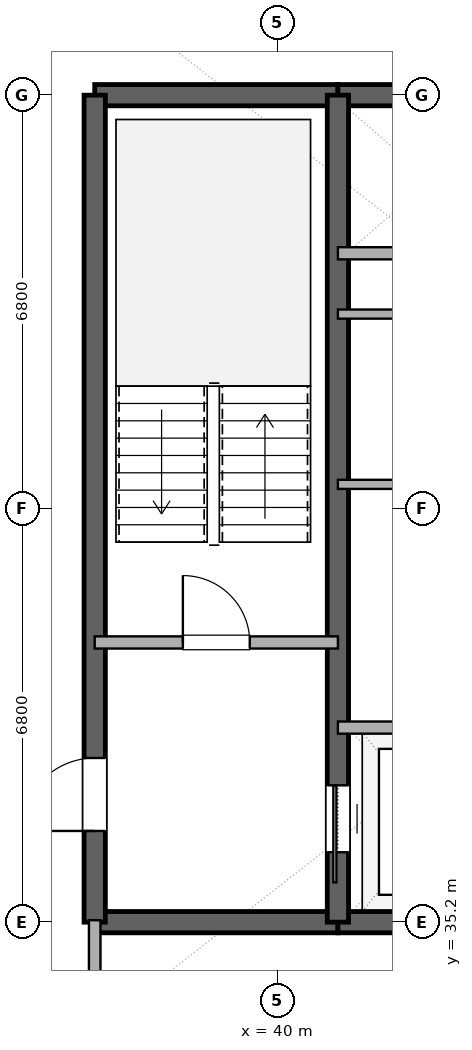
"""IFC4 building model, lengths in metres.
Left out: names, types, materials, properties, quantities, classifications, styles, units other than length and angle.
Written with IfcOpenShell. Run it as: python <this file> out.ifc"""

import sys

from ifc_helpers import new_model, si_unit, direction, frame, frame_2d, origin, place, context, subcontext, project, spatial, rectangle, extrude, element, fill, save


model = new_model("IFC4")
c1 = context("Model", 3, precision=1e-05, world=origin(), true_north=direction((0.0, 1.0)))
c2 = subcontext(c1, "Body", "Model", "MODEL_VIEW")
j1 = project(units=[si_unit("LENGTHUNIT", "METRE"), si_unit("PLANEANGLEUNIT", "RADIAN")], contexts=[c1])
p1 = place(None, origin())
s1 = spatial("IfcSite", under=j1, at=p1, CompositionType="ELEMENT")
p2 = place(p1, origin())
s2 = spatial("IfcBuilding", under=s1, at=p2, CompositionType="ELEMENT")
p3 = place(p2, frame((0.0, 0.0, 287.4)))
s3 = spatial("IfcBuildingStorey", under=s2, at=p3, CompositionType="ELEMENT", Elevation=287.4)
p4 = place(p3, frame((37.0, 35.2, 0.0), z_axis=(0.0, 0.0, 1.0), x_axis=(1.0, 0.0, 0.0)))
e1 = element("IfcWall", 1, at=p4, inside=s3, PredefinedType="SHEAR", context=c2, shape_type="SweptSolid", body=[
    extrude(rectangle(XDim=4.0, YDim=0.35, at=frame_2d((2.0, 0.0))), origin(), (0.0, 0.0, 1.0), 3.37),
])
p5 = place(p3, frame((41.0, 35.2, 0.0), z_axis=(0.0, 0.0, 1.0), x_axis=(1.0, 0.0, 0.0)))
e2 = element("IfcWall", 2, at=p5, inside=s3, PredefinedType="SHEAR", context=c2, shape_type="SweptSolid", body=[
    extrude(rectangle(XDim=14.0, YDim=0.35, at=frame_2d((7.0, 0.0))), origin(), (0.0, 0.0, 1.0), 3.37),
])
p6 = place(p5, frame((6.1, 0.0, 0.0)))
e3 = element("IfcOpeningElement", 3, at=p6, cuts=e2, PredefinedType="OPENING", context=c2, shape_type="SweptSolid", body=[
    extrude(rectangle(XDim=1.8, YDim=2.25, at=frame_2d((0.9, 1.125))), frame((0.0, 0.185, 0.0), z_axis=(0.0, -1.0, 0.0), x_axis=(1.0, 0.0, 0.0)), (0.0, 0.0, 1.0), 0.37),
])
p7 = place(p3, frame((37.0, 48.8, 0.0), z_axis=(0.0, 0.0, 1.0), x_axis=(1.0, 0.0, 0.0)))
e4 = element("IfcWall", 4, at=p7, inside=s3, PredefinedType="SHEAR", context=c2, shape_type="SweptSolid", body=[
    extrude(rectangle(XDim=4.0, YDim=0.35, at=frame_2d((2.0, 0.0))), origin(), (0.0, 0.0, 1.0), 3.37),
])
p8 = place(p3, frame((41.0, 48.8, 0.0), z_axis=(0.0, 0.0, 1.0), x_axis=(1.0, 0.0, 0.0)))
e5 = element("IfcWall", 5, at=p8, inside=s3, PredefinedType="SHEAR", context=c2, shape_type="SweptSolid", body=[
    extrude(rectangle(XDim=14.0, YDim=0.35, at=frame_2d((7.0, 0.0))), origin(), (0.0, 0.0, 1.0), 3.37),
])
p9 = place(p8, frame((6.1, 0.0, 0.0)))
e6 = element("IfcOpeningElement", 6, at=p9, cuts=e5, PredefinedType="OPENING", context=c2, shape_type="SweptSolid", body=[
    extrude(rectangle(XDim=1.8, YDim=2.25, at=frame_2d((0.9, 1.125))), frame((0.0, 0.185, 0.0), z_axis=(0.0, -1.0, 0.0), x_axis=(1.0, 0.0, 0.0)), (0.0, 0.0, 1.0), 0.37),
])
p10 = place(p3, frame((37.0, 35.2, 0.0), z_axis=(0.0, 0.0, 1.0), x_axis=(0.0, 1.0, 0.0)))
e7 = element("IfcWall", 7, at=p10, inside=s3, PredefinedType="SHEAR", context=c2, shape_type="SweptSolid", body=[
    extrude(rectangle(XDim=13.6, YDim=0.35, at=frame_2d((6.8, 0.0))), origin(), (0.0, 0.0, 1.0), 3.37),
])
p11 = place(p10, frame((1.5, 0.0, 0.0)))
e8 = element("IfcOpeningElement", 8, at=p11, cuts=e7, PredefinedType="OPENING", context=c2, shape_type="SweptSolid", body=[
    extrude(rectangle(XDim=1.2, YDim=2.15, at=frame_2d((0.6, 1.075))), frame((0.0, 0.185, 0.0), z_axis=(0.0, -1.0, 0.0), x_axis=(1.0, 0.0, 0.0)), (0.0, 0.0, 1.0), 0.37),
])
p12 = place(p3, frame((41.0, 35.2, 0.0), z_axis=(0.0, 0.0, 1.0), x_axis=(0.0, 1.0, 0.0)))
e9 = element("IfcWall", 9, at=p12, inside=s3, PredefinedType="SHEAR", context=c2, shape_type="SweptSolid", body=[
    extrude(rectangle(XDim=13.6, YDim=0.35, at=frame_2d((6.8, 0.0))), origin(), (0.0, 0.0, 1.0), 3.37),
])
p13 = place(p12, frame((1.15, 0.0, 0.0)))
e10 = element("IfcOpeningElement", 10, at=p13, cuts=e9, PredefinedType="OPENING", context=c2, shape_type="SweptSolid", body=[
    extrude(rectangle(XDim=1.1, YDim=2.2, at=frame_2d((0.55, 1.1))), frame((0.0, 0.185, 0.0), z_axis=(0.0, -1.0, 0.0), x_axis=(1.0, 0.0, 0.0)), (0.0, 0.0, 1.0), 0.37),
])
p14 = place(p3, frame((37.0, 39.8, 0.0), z_axis=(0.0, 0.0, 1.0), x_axis=(1.0, 0.0, 0.0)))
e11 = element("IfcWall", 11, at=p14, inside=s3, PredefinedType="SOLIDWALL", context=c2, shape_type="SweptSolid", body=[
    extrude(rectangle(XDim=4.0, YDim=0.2, at=frame_2d((2.0, 0.0))), origin(), (0.0, 0.0, 1.0), 2.73),
])
p15 = place(p14, frame((1.45, 0.0, 0.0)))
e12 = element("IfcOpeningElement", 12, at=p15, cuts=e11, PredefinedType="OPENING", context=c2, shape_type="SweptSolid", body=[
    extrude(rectangle(XDim=1.1, YDim=2.15, at=frame_2d((0.55, 1.075))), frame((0.0, 0.11, 0.0), z_axis=(0.0, -1.0, 0.0), x_axis=(1.0, 0.0, 0.0)), (0.0, 0.0, 1.0), 0.22),
])
for number, where, z_axis, x_axis in (
    (13, (41.0, 38.4, 0.0), (0.0, 0.0, 1.0), (1.0, 0.0, 0.0)),
    (14, (41.0, 46.2, 0.0), (0.0, 0.0, 1.0), (1.0, 0.0, 0.0)),
):
    element("IfcWall", number, at=place(p3, frame(where, z_axis=z_axis, x_axis=x_axis)), inside=s3, PredefinedType="SOLIDWALL", context=c2, shape_type="SweptSolid", body=[
        extrude(rectangle(XDim=2.95, YDim=0.2, at=frame_2d((1.475, 0.0))), origin(), (0.0, 0.0, 1.0), 2.73),
    ])
for number, where, z_axis, x_axis in (
    (15, (41.0, 42.4, 0.0), (0.0, 0.0, 1.0), (1.0, 0.0, 0.0)),
    (16, (41.0, 45.2, 0.0), (0.0, 0.0, 1.0), (1.0, 0.0, 0.0)),
):
    element("IfcWall", number, at=place(p3, frame(where, z_axis=z_axis, x_axis=x_axis)), inside=s3, PredefinedType="PARTITIONING", context=c2, shape_type="SweptSolid", body=[
        extrude(rectangle(XDim=4.85, YDim=0.15, at=frame_2d((2.425, 0.0))), origin(), (0.0, 0.0, 1.0), 2.73),
    ])
p16 = place(p3, frame((42.687, 35.2, 0.0), z_axis=(0.0, 0.0, 1.0), x_axis=(-0.615663811723, -0.788008928208, 0.0)))
e17 = element("IfcWall", 17, at=p16, inside=s3, PredefinedType="PARTITIONING", context=c2, shape_type="SweptSolid", body=[
    extrude(rectangle(XDim=12.701, YDim=0.2, at=frame_2d((6.351, 0.0))), origin(), (0.0, 0.0, 1.0), 2.73),
])
p17 = place(p3, frame((37.0, 35.232, 0.0), z_axis=(0.0, 0.0, 1.0), x_axis=(0.0, -1.0, 0.0)))
e18 = element("IfcWall", 18, at=p17, inside=s3, PredefinedType="PARTITIONING", context=c2, shape_type="SweptSolid", body=[
    extrude(rectangle(XDim=1.232, YDim=0.19, at=frame_2d((0.616, 0.0))), origin(), (0.0, 0.0, 1.0), 2.73),
])
p18 = place(p13, origin())
e19 = element("IfcDoor", 19, at=p18, inside=s3, OperationType="SLIDING_TO_LEFT", PredefinedType="DOOR", context=c2, shape_type="SweptSolid", body=[
    extrude(rectangle(XDim=1.1, YDim=2.2, at=frame_2d((0.55, 1.1))), frame((0.0, 0.025, 0.0), z_axis=(0.0, -1.0, 0.0), x_axis=(1.0, 0.0, 0.0)), (0.0, 0.0, 1.0), 0.05),
])
fill(e10, e19)
p19 = place(p11, origin())
e20 = element("IfcDoor", 20, at=p19, inside=s3, OperationType="SINGLE_SWING_LEFT", PredefinedType="DOOR", context=c2, shape_type="SweptSolid", body=[
    extrude(rectangle(XDim=1.2, YDim=2.15, at=frame_2d((0.6, 1.075))), frame((0.0, 0.025, 0.0), z_axis=(0.0, -1.0, 0.0), x_axis=(1.0, 0.0, 0.0)), (0.0, 0.0, 1.0), 0.05),
])
fill(e8, e20)
p20 = place(p15, origin())
e21 = element("IfcDoor", 21, at=p20, inside=s3, OperationType="SINGLE_SWING_LEFT", PredefinedType="DOOR", context=c2, shape_type="SweptSolid", body=[
    extrude(rectangle(XDim=1.1, YDim=2.15, at=frame_2d((0.55, 1.075))), frame((0.0, 0.025, 0.0), z_axis=(0.0, -1.0, 0.0), x_axis=(1.0, 0.0, 0.0)), (0.0, 0.0, 1.0), 0.05),
])
fill(e12, e21)
save(model, sys.argv[1])
